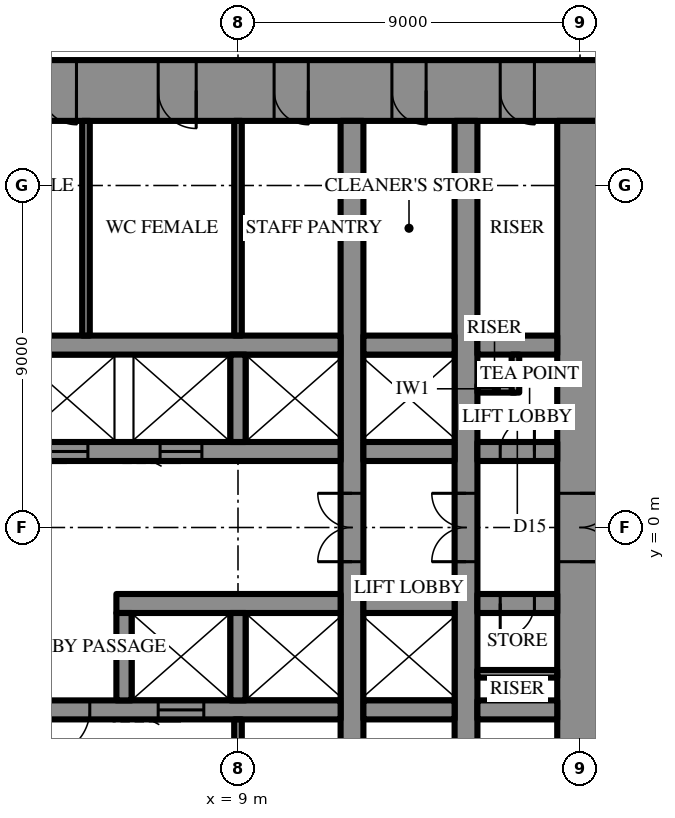
"""IFC4 building model, lengths in metres.
Left out: names, types, materials, properties, quantities, classifications, styles, units other than length and angle.
Written with IfcOpenShell. Run it as: python <this file> out.ifc"""

import sys

from ifc_helpers import new_model, si_unit, direction, frame, frame_2d, origin, place, context, subcontext, project, spatial, rectangle, extrude, element, fill, save


model = new_model("IFC4")
c1 = context("Model", 3, precision=1e-05, world=origin(), true_north=direction((0.0, 1.0)))
c2 = subcontext(c1, "Body", "Model", "MODEL_VIEW")
j1 = project(units=[si_unit("LENGTHUNIT", "METRE"), si_unit("PLANEANGLEUNIT", "RADIAN")], contexts=[c1])
p1 = place(None, origin())
s1 = spatial("IfcSite", under=j1, at=p1, CompositionType="ELEMENT")
p2 = place(p1, origin())
s2 = spatial("IfcBuilding", under=s1, at=p2, CompositionType="ELEMENT")
p3 = place(p2, frame((0.0, 0.0, 169.9)))
s3 = spatial("IfcBuildingStorey", under=s2, at=p3, CompositionType="ELEMENT", Elevation=169.9)
p4 = place(p3, frame((-18.6, 11.5, 0.0), z_axis=(0.0, 0.0, 1.0), x_axis=(1.0, 0.0, 0.0)))
e1 = element("IfcWall", 1, at=p4, inside=s3, PredefinedType="SHEAR", context=c2, shape_type="SweptSolid", body=[
    extrude(rectangle(XDim=37.2, YDim=1.6, at=frame_2d((18.6, 0.0))), origin(), (0.0, 0.0, 1.0), 4.2),
])
p5 = place(p4, frame((19.45, 0.0, 0.0)))
e2 = element("IfcOpeningElement", 2, at=p5, cuts=e1, PredefinedType="OPENING", context=c2, shape_type="SweptSolid", body=[
    extrude(rectangle(XDim=0.9, YDim=2.2, at=frame_2d((0.45, 1.1))), frame((0.0, 0.81, 0.0), z_axis=(0.0, -1.0, 0.0), x_axis=(1.0, 0.0, 0.0)), (0.0, 0.0, 1.0), 1.62),
])
p6 = place(p4, frame((22.45, 0.0, 0.0)))
e3 = element("IfcOpeningElement", 3, at=p6, cuts=e1, PredefinedType="OPENING", context=c2, shape_type="SweptSolid", body=[
    extrude(rectangle(XDim=0.9, YDim=2.2, at=frame_2d((0.45, 1.1))), frame((0.0, 0.81, 0.0), z_axis=(0.0, -1.0, 0.0), x_axis=(1.0, 0.0, 0.0)), (0.0, 0.0, 1.0), 1.62),
])
p7 = place(p4, frame((25.5, 0.0, 0.0)))
e4 = element("IfcOpeningElement", 4, at=p7, cuts=e1, PredefinedType="OPENING", context=c2, shape_type="SweptSolid", body=[
    extrude(rectangle(XDim=1.0, YDim=2.2, at=frame_2d((0.5, 1.1))), frame((0.0, 0.81, 0.0), z_axis=(0.0, -1.0, 0.0), x_axis=(1.0, 0.0, 0.0)), (0.0, 0.0, 1.0), 1.62),
])
p8 = place(p4, frame((1.8, 0.0, 0.0)))
e5 = element("IfcOpeningElement", 5, at=p8, cuts=e1, PredefinedType="OPENING", context=c2, shape_type="SweptSolid", body=[
    extrude(rectangle(XDim=0.9, YDim=2.2, at=frame_2d((0.45, 1.1))), frame((0.0, 0.81, 0.0), z_axis=(0.0, -1.0, 0.0), x_axis=(1.0, 0.0, 0.0)), (0.0, 0.0, 1.0), 1.62),
])
p9 = place(p4, frame((4.65, 0.0, 0.0)))
e6 = element("IfcOpeningElement", 6, at=p9, cuts=e1, PredefinedType="OPENING", context=c2, shape_type="SweptSolid", body=[
    extrude(rectangle(XDim=0.9, YDim=2.2, at=frame_2d((0.45, 1.1))), frame((0.0, 0.81, 0.0), z_axis=(0.0, -1.0, 0.0), x_axis=(1.0, 0.0, 0.0)), (0.0, 0.0, 1.0), 1.62),
])
p10 = place(p4, frame((7.75, 0.0, 0.0)))
e7 = element("IfcOpeningElement", 7, at=p10, cuts=e1, PredefinedType="OPENING", context=c2, shape_type="SweptSolid", body=[
    extrude(rectangle(XDim=0.9, YDim=2.2, at=frame_2d((0.45, 1.1))), frame((0.0, 0.81, 0.0), z_axis=(0.0, -1.0, 0.0), x_axis=(1.0, 0.0, 0.0)), (0.0, 0.0, 1.0), 1.62),
])
p11 = place(p4, frame((28.55, 0.0, 0.0)))
e8 = element("IfcOpeningElement", 8, at=p11, cuts=e1, PredefinedType="OPENING", context=c2, shape_type="SweptSolid", body=[
    extrude(rectangle(XDim=0.9, YDim=2.2, at=frame_2d((0.45, 1.1))), frame((0.0, 0.81, 0.0), z_axis=(0.0, -1.0, 0.0), x_axis=(1.0, 0.0, 0.0)), (0.0, 0.0, 1.0), 1.62),
])
p12 = place(p4, frame((31.65, 0.0, 0.0)))
e9 = element("IfcOpeningElement", 9, at=p12, cuts=e1, PredefinedType="OPENING", context=c2, shape_type="SweptSolid", body=[
    extrude(rectangle(XDim=0.9, YDim=2.2, at=frame_2d((0.45, 1.1))), frame((0.0, 0.81, 0.0), z_axis=(0.0, -1.0, 0.0), x_axis=(1.0, 0.0, 0.0)), (0.0, 0.0, 1.0), 1.62),
])
p13 = place(p4, frame((34.5, 0.0, 0.0)))
e10 = element("IfcOpeningElement", 10, at=p13, cuts=e1, PredefinedType="OPENING", context=c2, shape_type="SweptSolid", body=[
    extrude(rectangle(XDim=0.9, YDim=2.2, at=frame_2d((0.45, 1.1))), frame((0.0, 0.81, 0.0), z_axis=(0.0, -1.0, 0.0), x_axis=(1.0, 0.0, 0.0)), (0.0, 0.0, 1.0), 1.62),
])
p14 = place(p3, frame((18.0, -10.7, 0.0), z_axis=(0.0, 0.0, 1.0), x_axis=(0.0, 1.0, 0.0)))
e11 = element("IfcWall", 11, at=p14, inside=s3, PredefinedType="SHEAR", context=c2, shape_type="SweptSolid", body=[
    extrude(rectangle(XDim=21.4, YDim=1.2, at=frame_2d((10.7, 0.0))), origin(), (0.0, 0.0, 1.0), 4.2),
])
p15 = place(p14, frame((9.8, 0.0, 0.0)))
e12 = element("IfcOpeningElement", 12, at=p15, cuts=e11, PredefinedType="OPENING", context=c2, shape_type="SweptSolid", body=[
    extrude(rectangle(XDim=1.8, YDim=2.4, at=frame_2d((0.9, 1.2))), frame((0.0, 0.61, 0.0), z_axis=(0.0, -1.0, 0.0), x_axis=(1.0, 0.0, 0.0)), (0.0, 0.0, 1.0), 1.22),
])
p16 = place(p3, frame((12.0, -10.7, 0.0), z_axis=(0.0, 0.0, 1.0), x_axis=(0.0, 1.0, 0.0)))
e13 = element("IfcWall", 13, at=p16, inside=s3, PredefinedType="SHEAR", context=c2, shape_type="SweptSolid", body=[
    extrude(rectangle(XDim=21.4, YDim=0.6, at=frame_2d((10.7, 0.0))), origin(), (0.0, 0.0, 1.0), 4.2),
])
p17 = place(p16, frame((9.8, 0.0, 0.0)))
e14 = element("IfcOpeningElement", 14, at=p17, cuts=e13, PredefinedType="OPENING", context=c2, shape_type="SweptSolid", body=[
    extrude(rectangle(XDim=1.8, YDim=2.4, at=frame_2d((0.9, 1.2))), frame((0.0, 0.31, 0.0), z_axis=(0.0, -1.0, 0.0), x_axis=(1.0, 0.0, 0.0)), (0.0, 0.0, 1.0), 0.62),
])
p18 = place(p3, frame((15.0, -10.7, 0.0), z_axis=(0.0, 0.0, 1.0), x_axis=(0.0, 1.0, 0.0)))
e15 = element("IfcWall", 15, at=p18, inside=s3, PredefinedType="SHEAR", context=c2, shape_type="SweptSolid", body=[
    extrude(rectangle(XDim=21.4, YDim=0.6, at=frame_2d((10.7, 0.0))), origin(), (0.0, 0.0, 1.0), 4.2),
])
p19 = place(p18, frame((9.8, 0.0, 0.0)))
e16 = element("IfcOpeningElement", 16, at=p19, cuts=e15, PredefinedType="OPENING", context=c2, shape_type="SweptSolid", body=[
    extrude(rectangle(XDim=1.8, YDim=2.4, at=frame_2d((0.9, 1.2))), frame((0.0, 0.31, 0.0), z_axis=(0.0, -1.0, 0.0), x_axis=(1.0, 0.0, 0.0)), (0.0, 0.0, 1.0), 0.62),
])
p20 = place(p3, frame((-3.2, 2.0, 0.0), z_axis=(0.0, 0.0, 1.0), x_axis=(1.0, 0.0, 0.0)))
e17 = element("IfcWall", 17, at=p20, inside=s3, PredefinedType="SHEAR", context=c2, shape_type="SweptSolid", body=[
    extrude(rectangle(XDim=14.9, YDim=0.5, at=frame_2d((7.45, 0.0))), origin(), (0.0, 0.0, 1.0), 4.2),
])
p21 = place(p20, frame((1.15, 0.0, 0.0)))
e18 = element("IfcOpeningElement", 18, at=p21, cuts=e17, PredefinedType="OPENING", context=c2, shape_type="SweptSolid", body=[
    extrude(rectangle(XDim=1.1, YDim=2.2, at=frame_2d((0.55, 1.1))), frame((0.0, 0.26, 0.0), z_axis=(0.0, -1.0, 0.0), x_axis=(1.0, 0.0, 0.0)), (0.0, 0.0, 1.0), 0.52),
])
p22 = place(p20, frame((4.15, 0.0, 0.0)))
e19 = element("IfcOpeningElement", 19, at=p22, cuts=e17, PredefinedType="OPENING", context=c2, shape_type="SweptSolid", body=[
    extrude(rectangle(XDim=1.1, YDim=2.2, at=frame_2d((0.55, 1.1))), frame((0.0, 0.26, 0.0), z_axis=(0.0, -1.0, 0.0), x_axis=(1.0, 0.0, 0.0)), (0.0, 0.0, 1.0), 0.52),
])
p23 = place(p20, frame((7.15, 0.0, 0.0)))
e20 = element("IfcOpeningElement", 20, at=p23, cuts=e17, PredefinedType="OPENING", context=c2, shape_type="SweptSolid", body=[
    extrude(rectangle(XDim=1.1, YDim=2.2, at=frame_2d((0.55, 1.1))), frame((0.0, 0.26, 0.0), z_axis=(0.0, -1.0, 0.0), x_axis=(1.0, 0.0, 0.0)), (0.0, 0.0, 1.0), 0.52),
])
p24 = place(p20, frame((10.15, 0.0, 0.0)))
e21 = element("IfcOpeningElement", 21, at=p24, cuts=e17, PredefinedType="OPENING", context=c2, shape_type="SweptSolid", body=[
    extrude(rectangle(XDim=1.1, YDim=2.2, at=frame_2d((0.55, 1.1))), frame((0.0, 0.26, 0.0), z_axis=(0.0, -1.0, 0.0), x_axis=(1.0, 0.0, 0.0)), (0.0, 0.0, 1.0), 0.52),
])
p25 = place(p3, frame((12.3, 2.0, 0.0), z_axis=(0.0, 0.0, 1.0), x_axis=(1.0, 0.0, 0.0)))
e22 = element("IfcWall", 22, at=p25, inside=s3, PredefinedType="SHEAR", context=c2, shape_type="SweptSolid", body=[
    extrude(rectangle(XDim=2.4, YDim=0.5, at=frame_2d((1.2, 0.0))), origin(), (0.0, 0.0, 1.0), 4.2),
])
p26 = place(p3, frame((15.3, 2.0, 0.0), z_axis=(0.0, 0.0, 1.0), x_axis=(1.0, 0.0, 0.0)))
e23 = element("IfcWall", 23, at=p26, inside=s3, PredefinedType="SHEAR", context=c2, shape_type="SweptSolid", body=[
    extrude(rectangle(XDim=2.1, YDim=0.5, at=frame_2d((1.05, 0.0))), origin(), (0.0, 0.0, 1.0), 4.2),
])
p27 = place(p26, frame((0.6, 0.0, 0.0)))
e24 = element("IfcOpeningElement", 24, at=p27, cuts=e23, PredefinedType="OPENING", context=c2, shape_type="SweptSolid", body=[
    extrude(rectangle(XDim=0.9, YDim=2.2, at=frame_2d((0.45, 1.1))), frame((0.0, 0.26, 0.0), z_axis=(0.0, -1.0, 0.0), x_axis=(1.0, 0.0, 0.0)), (0.0, 0.0, 1.0), 0.52),
])
p28 = place(p3, frame((-11.7, 4.8, 0.0), z_axis=(0.0, 0.0, 1.0), x_axis=(1.0, 0.0, 0.0)))
e25 = element("IfcWall", 25, at=p28, inside=s3, PredefinedType="SHEAR", context=c2, shape_type="SweptSolid", body=[
    extrude(rectangle(XDim=23.4, YDim=0.5, at=frame_2d((11.7, 0.0))), origin(), (0.0, 0.0, 1.0), 4.2),
])
p29 = place(p28, frame((6.6, 0.0, 0.0)))
e26 = element("IfcOpeningElement", 26, at=p29, cuts=e25, PredefinedType="OPENING", context=c2, shape_type="SweptSolid", body=[
    extrude(rectangle(XDim=1.2, YDim=2.2, at=frame_2d((0.6, 1.1))), frame((0.0, 0.26, 0.0), z_axis=(0.0, -1.0, 0.0), x_axis=(1.0, 0.0, 0.0)), (0.0, 0.0, 1.0), 0.52),
])
p30 = place(p28, frame((3.6, 0.0, 0.0)))
e27 = element("IfcOpeningElement", 27, at=p30, cuts=e25, PredefinedType="OPENING", context=c2, shape_type="SweptSolid", body=[
    extrude(rectangle(XDim=1.2, YDim=2.2, at=frame_2d((0.6, 1.1))), frame((0.0, 0.26, 0.0), z_axis=(0.0, -1.0, 0.0), x_axis=(1.0, 0.0, 0.0)), (0.0, 0.0, 1.0), 0.52),
])
p31 = place(p3, frame((12.3, 4.8, 0.0), z_axis=(0.0, 0.0, 1.0), x_axis=(1.0, 0.0, 0.0)))
e28 = element("IfcWall", 28, at=p31, inside=s3, PredefinedType="SHEAR", context=c2, shape_type="SweptSolid", body=[
    extrude(rectangle(XDim=2.4, YDim=0.5, at=frame_2d((1.2, 0.0))), origin(), (0.0, 0.0, 1.0), 4.2),
])
p32 = place(p3, frame((15.3, 4.8, 0.0), z_axis=(0.0, 0.0, 1.0), x_axis=(1.0, 0.0, 0.0)))
e29 = element("IfcWall", 29, at=p32, inside=s3, PredefinedType="SHEAR", context=c2, shape_type="SweptSolid", body=[
    extrude(rectangle(XDim=2.1, YDim=0.5, at=frame_2d((1.05, 0.0))), origin(), (0.0, 0.0, 1.0), 4.2),
])
p33 = place(p3, frame((9.0, 2.25, 0.0), z_axis=(0.0, 0.0, 1.0), x_axis=(0.0, 1.0, 0.0)))
e30 = element("IfcWall", 30, at=p33, inside=s3, PredefinedType="SHEAR", context=c2, shape_type="SweptSolid", body=[
    extrude(rectangle(XDim=2.3, YDim=0.4, at=frame_2d((1.15, 0.0))), origin(), (0.0, 0.0, 1.0), 4.2),
])
p34 = place(p3, frame((17.4, -2.0, 0.0), z_axis=(0.0, 0.0, 1.0), x_axis=(-1.0, 0.0, 0.0)))
e31 = element("IfcWall", 31, at=p34, inside=s3, PredefinedType="SHEAR", context=c2, shape_type="SweptSolid", body=[
    extrude(rectangle(XDim=2.1, YDim=0.5, at=frame_2d((1.05, 0.0))), origin(), (0.0, 0.0, 1.0), 4.2),
])
p35 = place(p34, frame((0.6, 0.0, 0.0)))
e32 = element("IfcOpeningElement", 32, at=p35, cuts=e31, PredefinedType="OPENING", context=c2, shape_type="SweptSolid", body=[
    extrude(rectangle(XDim=0.9, YDim=2.2, at=frame_2d((0.45, 1.1))), frame((0.0, 0.26, 0.0), z_axis=(0.0, -1.0, 0.0), x_axis=(1.0, 0.0, 0.0)), (0.0, 0.0, 1.0), 0.52),
])
p36 = place(p3, frame((14.7, -2.0, 0.0), z_axis=(0.0, 0.0, 1.0), x_axis=(-1.0, 0.0, 0.0)))
e33 = element("IfcWall", 33, at=p36, inside=s3, PredefinedType="SHEAR", context=c2, shape_type="SweptSolid", body=[
    extrude(rectangle(XDim=2.4, YDim=0.5, at=frame_2d((1.2, 0.0))), origin(), (0.0, 0.0, 1.0), 4.2),
])
p37 = place(p3, frame((11.7, -2.0, 0.0), z_axis=(0.0, 0.0, 1.0), x_axis=(-1.0, 0.0, 0.0)))
e34 = element("IfcWall", 34, at=p37, inside=s3, PredefinedType="SHEAR", context=c2, shape_type="SweptSolid", body=[
    extrude(rectangle(XDim=5.9, YDim=0.5, at=frame_2d((2.95, 0.0))), origin(), (0.0, 0.0, 1.0), 4.2),
])
p38 = place(p3, frame((17.4, -4.8, 0.0), z_axis=(0.0, 0.0, 1.0), x_axis=(-1.0, 0.0, 0.0)))
e35 = element("IfcWall", 35, at=p38, inside=s3, PredefinedType="SHEAR", context=c2, shape_type="SweptSolid", body=[
    extrude(rectangle(XDim=2.1, YDim=0.5, at=frame_2d((1.05, 0.0))), origin(), (0.0, 0.0, 1.0), 4.2),
])
p39 = place(p3, frame((14.7, -4.8, 0.0), z_axis=(0.0, 0.0, 1.0), x_axis=(-1.0, 0.0, 0.0)))
e36 = element("IfcWall", 36, at=p39, inside=s3, PredefinedType="SHEAR", context=c2, shape_type="SweptSolid", body=[
    extrude(rectangle(XDim=2.4, YDim=0.5, at=frame_2d((1.2, 0.0))), origin(), (0.0, 0.0, 1.0), 4.2),
])
p40 = place(p3, frame((11.7, -4.8, 0.0), z_axis=(0.0, 0.0, 1.0), x_axis=(-1.0, 0.0, 0.0)))
e37 = element("IfcWall", 37, at=p40, inside=s3, PredefinedType="SHEAR", context=c2, shape_type="SweptSolid", body=[
    extrude(rectangle(XDim=23.4, YDim=0.5, at=frame_2d((11.7, 0.0))), origin(), (0.0, 0.0, 1.0), 4.2),
])
p41 = place(p40, frame((6.6, 0.0, 0.0)))
e38 = element("IfcOpeningElement", 38, at=p41, cuts=e37, PredefinedType="OPENING", context=c2, shape_type="SweptSolid", body=[
    extrude(rectangle(XDim=1.2, YDim=2.2, at=frame_2d((0.6, 1.1))), frame((0.0, 0.26, 0.0), z_axis=(0.0, -1.0, 0.0), x_axis=(1.0, 0.0, 0.0)), (0.0, 0.0, 1.0), 0.52),
])
p42 = place(p40, frame((3.6, 0.0, 0.0)))
e39 = element("IfcOpeningElement", 39, at=p42, cuts=e37, PredefinedType="OPENING", context=c2, shape_type="SweptSolid", body=[
    extrude(rectangle(XDim=1.2, YDim=2.2, at=frame_2d((0.6, 1.1))), frame((0.0, 0.26, 0.0), z_axis=(0.0, -1.0, 0.0), x_axis=(1.0, 0.0, 0.0)), (0.0, 0.0, 1.0), 0.52),
])
for number, where, z_axis, x_axis in (
    (40, (9.0, -2.25, 0.0), (0.0, 0.0, 1.0), (0.0, -1.0, 0.0)),
    (41, (6.0, -2.25, 0.0), (0.0, 0.0, 1.0), (0.0, -1.0, 0.0)),
):
    element("IfcWall", number, at=place(p3, frame(where, z_axis=z_axis, x_axis=x_axis)), inside=s3, PredefinedType="SHEAR", context=c2, shape_type="SweptSolid", body=[
        extrude(rectangle(XDim=2.3, YDim=0.4, at=frame_2d((1.15, 0.0))), origin(), (0.0, 0.0, 1.0), 4.2),
    ])
for number, where, z_axis, x_axis in (
    (42, (9.0, 5.05, 0.0), (0.0, 0.0, 1.0), (0.0, 1.0, 0.0)),
    (43, (5.0, 5.05, 0.0), (0.0, 0.0, 1.0), (0.0, 1.0, 0.0)),
    (44, (9.0, -5.05, 0.0), (0.0, 0.0, 1.0), (0.0, -1.0, 0.0)),
):
    element("IfcWall", number, at=place(p3, frame(where, z_axis=z_axis, x_axis=x_axis)), inside=s3, PredefinedType="PARTITIONING", context=c2, shape_type="SweptSolid", body=[
        extrude(rectangle(XDim=5.65, YDim=0.2, at=frame_2d((2.825, 0.0))), origin(), (0.0, 0.0, 1.0), 4.0),
    ])
for number, where, z_axis, x_axis in (
    (45, (15.3, 3.65, 0.0), (0.0, 0.0, 1.0), (1.0, 0.0, 0.0)),
    (46, (16.3, 3.55, 0.0), (0.0, 0.0, 1.0), (0.0, 1.0, 0.0)),
):
    element("IfcWall", number, at=place(p3, frame(where, z_axis=z_axis, x_axis=x_axis)), inside=s3, PredefinedType="PARTITIONING", context=c2, shape_type="SweptSolid", body=[
        extrude(rectangle(XDim=1.0, YDim=0.2, at=frame_2d((0.5, 0.0))), origin(), (0.0, 0.0, 1.0), 4.0),
    ])
p43 = place(p3, frame((17.4, -3.85, 0.0), z_axis=(0.0, 0.0, 1.0), x_axis=(-1.0, 0.0, 0.0)))
e47 = element("IfcWall", 47, at=p43, inside=s3, PredefinedType="PARTITIONING", context=c2, shape_type="SweptSolid", body=[
    extrude(rectangle(XDim=2.1, YDim=0.2, at=frame_2d((1.05, 0.0))), origin(), (0.0, 0.0, 1.0), 4.0),
])
p44 = place(p15, frame((1.8, 0.0, 0.0), z_axis=(0.0, 0.0, 1.0), x_axis=(-1.0, 0.0, 0.0)))
e48 = element("IfcDoor", 48, at=p44, inside=s3, OperationType="DOUBLE_DOOR_SINGLE_SWING", PredefinedType="DOOR", context=c2, shape_type="SweptSolid", body=[
    extrude(rectangle(XDim=1.8, YDim=2.4, at=frame_2d((0.9, 1.2))), frame((0.0, 0.025, 0.0), z_axis=(0.0, -1.0, 0.0), x_axis=(1.0, 0.0, 0.0)), (0.0, 0.0, 1.0), 0.05),
])
fill(e12, e48)
p45 = place(p6, frame((0.9, 0.0, 0.0), z_axis=(0.0, 0.0, 1.0), x_axis=(-1.0, 0.0, 0.0)))
e49 = element("IfcDoor", 49, at=p45, inside=s3, OperationType="SINGLE_SWING_RIGHT", PredefinedType="DOOR", context=c2, shape_type="SweptSolid", body=[
    extrude(rectangle(XDim=0.9, YDim=2.2, at=frame_2d((0.45, 1.1))), frame((0.0, 0.025, 0.0), z_axis=(0.0, -1.0, 0.0), x_axis=(1.0, 0.0, 0.0)), (0.0, 0.0, 1.0), 0.05),
])
fill(e3, e49)
p46 = place(p7, frame((1.0, 0.0, 0.0), z_axis=(0.0, 0.0, 1.0), x_axis=(-1.0, 0.0, 0.0)))
e50 = element("IfcDoor", 50, at=p46, inside=s3, OperationType="SINGLE_SWING_RIGHT", PredefinedType="DOOR", context=c2, shape_type="SweptSolid", body=[
    extrude(rectangle(XDim=1.0, YDim=2.2, at=frame_2d((0.5, 1.1))), frame((0.0, 0.025, 0.0), z_axis=(0.0, -1.0, 0.0), x_axis=(1.0, 0.0, 0.0)), (0.0, 0.0, 1.0), 0.05),
])
fill(e4, e50)
p47 = place(p11, frame((0.9, 0.0, 0.0), z_axis=(0.0, 0.0, 1.0), x_axis=(-1.0, 0.0, 0.0)))
e51 = element("IfcDoor", 51, at=p47, inside=s3, OperationType="SINGLE_SWING_RIGHT", PredefinedType="DOOR", context=c2, shape_type="SweptSolid", body=[
    extrude(rectangle(XDim=0.9, YDim=2.2, at=frame_2d((0.45, 1.1))), frame((0.0, 0.025, 0.0), z_axis=(0.0, -1.0, 0.0), x_axis=(1.0, 0.0, 0.0)), (0.0, 0.0, 1.0), 0.05),
])
fill(e8, e51)
p48 = place(p12, frame((0.9, 0.0, 0.0), z_axis=(0.0, 0.0, 1.0), x_axis=(-1.0, 0.0, 0.0)))
e52 = element("IfcDoor", 52, at=p48, inside=s3, OperationType="SINGLE_SWING_RIGHT", PredefinedType="DOOR", context=c2, shape_type="SweptSolid", body=[
    extrude(rectangle(XDim=0.9, YDim=2.2, at=frame_2d((0.45, 1.1))), frame((0.0, 0.025, 0.0), z_axis=(0.0, -1.0, 0.0), x_axis=(1.0, 0.0, 0.0)), (0.0, 0.0, 1.0), 0.05),
])
fill(e9, e52)
p49 = place(p13, frame((0.9, 0.0, 0.0), z_axis=(0.0, 0.0, 1.0), x_axis=(-1.0, 0.0, 0.0)))
e53 = element("IfcDoor", 53, at=p49, inside=s3, OperationType="SINGLE_SWING_RIGHT", PredefinedType="DOOR", context=c2, shape_type="SweptSolid", body=[
    extrude(rectangle(XDim=0.9, YDim=2.2, at=frame_2d((0.45, 1.1))), frame((0.0, 0.025, 0.0), z_axis=(0.0, -1.0, 0.0), x_axis=(1.0, 0.0, 0.0)), (0.0, 0.0, 1.0), 0.05),
])
fill(e10, e53)
p50 = place(p41, origin())
e54 = element("IfcDoor", 54, at=p50, inside=s3, OperationType="SINGLE_SWING_LEFT", PredefinedType="DOOR", context=c2, shape_type="SweptSolid", body=[
    extrude(rectangle(XDim=1.2, YDim=2.2, at=frame_2d((0.6, 1.1))), frame((0.0, 0.025, 0.0), z_axis=(0.0, -1.0, 0.0), x_axis=(1.0, 0.0, 0.0)), (0.0, 0.0, 1.0), 0.05),
])
fill(e38, e54)
p51 = place(p27, origin())
e55 = element("IfcDoor", 55, at=p51, inside=s3, OperationType="SINGLE_SWING_LEFT", PredefinedType="DOOR", context=c2, shape_type="SweptSolid", body=[
    extrude(rectangle(XDim=0.9, YDim=2.2, at=frame_2d((0.45, 1.1))), frame((0.0, 0.025, 0.0), z_axis=(0.0, -1.0, 0.0), x_axis=(1.0, 0.0, 0.0)), (0.0, 0.0, 1.0), 0.05),
])
fill(e24, e55)
p52 = place(p35, origin())
e56 = element("IfcDoor", 56, at=p52, inside=s3, OperationType="SINGLE_SWING_LEFT", PredefinedType="DOOR", context=c2, shape_type="SweptSolid", body=[
    extrude(rectangle(XDim=0.9, YDim=2.2, at=frame_2d((0.45, 1.1))), frame((0.0, 0.025, 0.0), z_axis=(0.0, -1.0, 0.0), x_axis=(1.0, 0.0, 0.0)), (0.0, 0.0, 1.0), 0.05),
])
fill(e32, e56)
p53 = place(p17, origin())
e57 = element("IfcDoor", 57, at=p53, inside=s3, OperationType="DOUBLE_DOOR_SINGLE_SWING", PredefinedType="DOOR", context=c2, shape_type="SweptSolid", body=[
    extrude(rectangle(XDim=1.8, YDim=2.4, at=frame_2d((0.9, 1.2))), frame((0.0, 0.025, 0.0), z_axis=(0.0, -1.0, 0.0), x_axis=(1.0, 0.0, 0.0)), (0.0, 0.0, 1.0), 0.05),
])
fill(e14, e57)
p54 = place(p19, origin())
e58 = element("IfcDoor", 58, at=p54, inside=s3, OperationType="DOUBLE_DOOR_SINGLE_SWING", PredefinedType="DOOR", context=c2, shape_type="SweptSolid", body=[
    extrude(rectangle(XDim=1.8, YDim=2.4, at=frame_2d((0.9, 1.2))), frame((0.0, 0.025, 0.0), z_axis=(0.0, -1.0, 0.0), x_axis=(1.0, 0.0, 0.0)), (0.0, 0.0, 1.0), 0.05),
])
fill(e16, e58)
p55 = place(p23, frame((1.1, 0.0, 0.0), z_axis=(0.0, 0.0, 1.0), x_axis=(-1.0, 0.0, 0.0)))
e59 = element("IfcDoor", 59, at=p55, inside=s3, OperationType="SLIDING_TO_LEFT", PredefinedType="DOOR", context=c2, shape_type="SweptSolid", body=[
    extrude(rectangle(XDim=1.1, YDim=2.2, at=frame_2d((0.55, 1.1))), frame((0.0, 0.025, 0.0), z_axis=(0.0, -1.0, 0.0), x_axis=(1.0, 0.0, 0.0)), (0.0, 0.0, 1.0), 0.05),
])
fill(e20, e59)
p56 = place(p24, frame((1.1, 0.0, 0.0), z_axis=(0.0, 0.0, 1.0), x_axis=(-1.0, 0.0, 0.0)))
e60 = element("IfcDoor", 60, at=p56, inside=s3, OperationType="SLIDING_TO_LEFT", PredefinedType="DOOR", context=c2, shape_type="SweptSolid", body=[
    extrude(rectangle(XDim=1.1, YDim=2.2, at=frame_2d((0.55, 1.1))), frame((0.0, 0.025, 0.0), z_axis=(0.0, -1.0, 0.0), x_axis=(1.0, 0.0, 0.0)), (0.0, 0.0, 1.0), 0.05),
])
fill(e21, e60)
p57 = place(p42, origin())
e61 = element("IfcDoor", 61, at=p57, inside=s3, OperationType="SLIDING_TO_LEFT", PredefinedType="DOOR", context=c2, shape_type="SweptSolid", body=[
    extrude(rectangle(XDim=1.2, YDim=2.2, at=frame_2d((0.6, 1.1))), frame((0.0, 0.025, 0.0), z_axis=(0.0, -1.0, 0.0), x_axis=(1.0, 0.0, 0.0)), (0.0, 0.0, 1.0), 0.05),
])
fill(e39, e61)
save(model, sys.argv[1])
